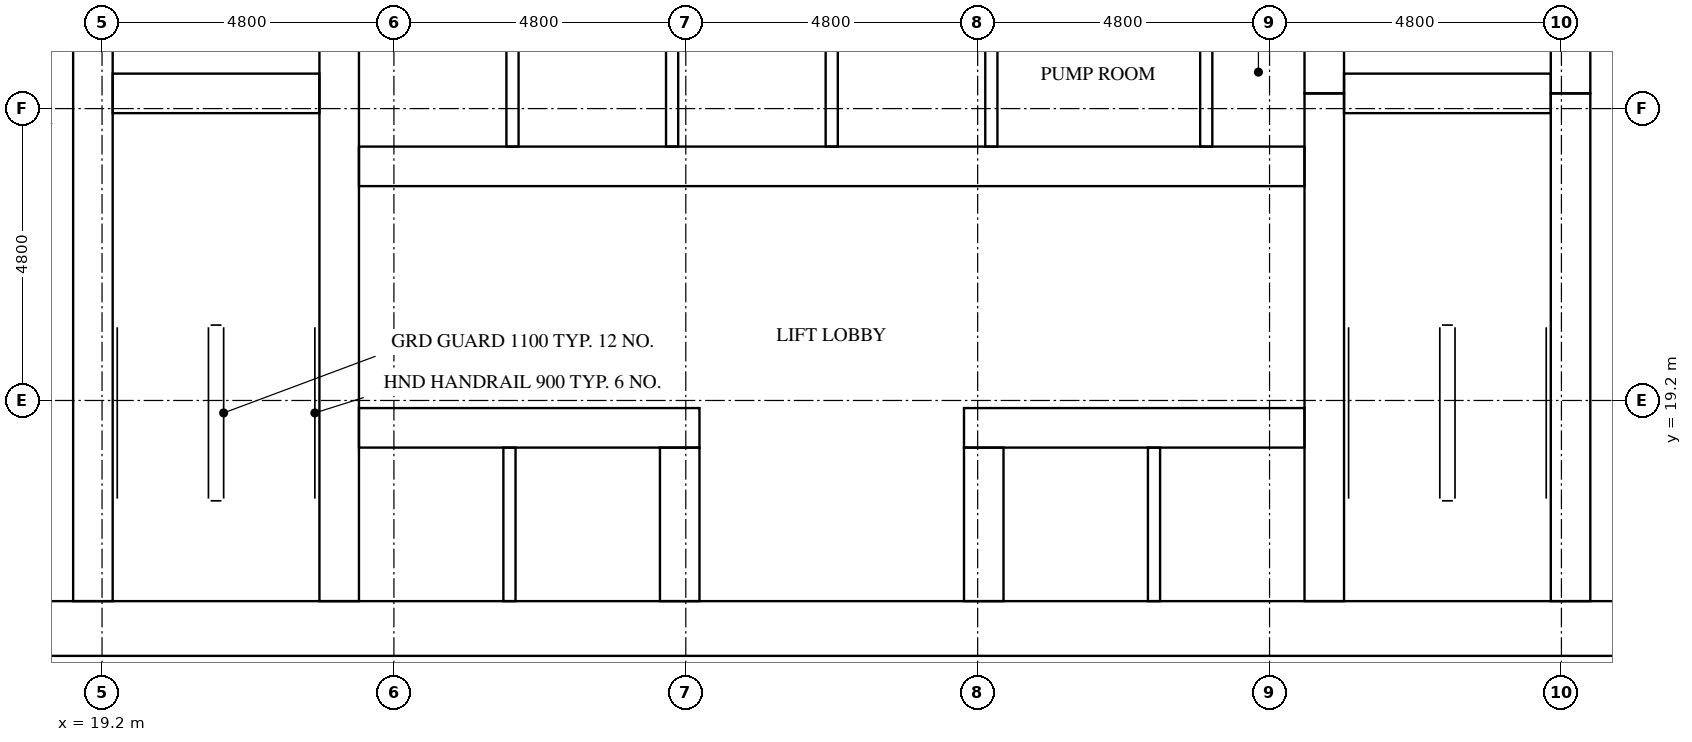
"""IFC4 building model, lengths in metres.
Left out: names, types, materials, properties, quantities, classifications, styles, units other than length and angle.
Written with IfcOpenShell. Run it as: python <this file> out.ifc"""

import sys

from ifc_helpers import new_model, si_unit, direction, frame, frame_2d, origin, place, context, subcontext, project, spatial, rectangle, extrude, element, fill, save


model = new_model("IFC4")
c1 = context("Model", 3, precision=1e-05, world=origin(), true_north=direction((0.0, 1.0)))
c2 = subcontext(c1, "Body", "Model", "MODEL_VIEW")
j1 = project(units=[si_unit("LENGTHUNIT", "METRE"), si_unit("PLANEANGLEUNIT", "RADIAN")], contexts=[c1])
p1 = place(None, origin())
s1 = spatial("IfcSite", under=j1, at=p1, CompositionType="ELEMENT")
p2 = place(p1, origin())
s2 = spatial("IfcBuilding", under=s1, at=p2, CompositionType="ELEMENT")
p3 = place(p2, frame((0.0, 0.0, 80.3)))
s3 = spatial("IfcBuildingStorey", under=s2, at=p3, CompositionType="ELEMENT", Elevation=80.3)
p4 = place(p3, frame((15.0, 15.45, 0.0), z_axis=(0.0, 0.0, 1.0), x_axis=(1.0, 0.0, 0.0)))
e1 = element("IfcWall", 1, at=p4, inside=s3, PredefinedType="SHEAR", context=c2, shape_type="SweptSolid", body=[
    extrude(rectangle(XDim=32.4, YDim=0.9, at=frame_2d((16.2, 0.0))), origin(), (0.0, 0.0, 1.0), 3.1),
])
p5 = place(p4, frame((15.3, 0.0, 0.0)))
e2 = element("IfcOpeningElement", 2, at=p5, cuts=e1, PredefinedType="OPENING", context=c2, shape_type="SweptSolid", body=[
    extrude(rectangle(XDim=1.8, YDim=2.1, at=frame_2d((0.9, 1.05))), frame((0.0, 0.46, 0.0), z_axis=(0.0, -1.0, 0.0), x_axis=(1.0, 0.0, 0.0)), (0.0, 0.0, 1.0), 0.92),
])
p6 = place(p3, frame((19.05, 15.9, 0.0), z_axis=(0.0, 0.0, 1.0), x_axis=(0.0, 1.0, 0.0)))
e3 = element("IfcWall", 3, at=p6, inside=s3, PredefinedType="SHEAR", context=c2, shape_type="SweptSolid", body=[
    extrude(rectangle(XDim=15.025, YDim=0.65, at=frame_2d((7.513, 0.0))), origin(), (0.0, 0.0, 1.0), 3.1),
])
p7 = place(p6, frame((9.55, 0.0, 0.0)))
e4 = element("IfcOpeningElement", 4, at=p7, cuts=e3, PredefinedType="OPENING", context=c2, shape_type="SweptSolid", body=[
    extrude(rectangle(XDim=1.1, YDim=2.1, at=frame_2d((0.55, 1.05))), frame((0.0, 0.335, 0.0), z_axis=(0.0, -1.0, 0.0), x_axis=(1.0, 0.0, 0.0)), (0.0, 0.0, 1.0), 0.67),
])
p8 = place(p6, frame((13.05, 0.0, 0.0)))
e5 = element("IfcOpeningElement", 5, at=p8, cuts=e3, PredefinedType="OPENING", context=c2, shape_type="SweptSolid", body=[
    extrude(rectangle(XDim=1.1, YDim=2.1, at=frame_2d((0.55, 1.05))), frame((0.0, 0.335, 0.0), z_axis=(0.0, -1.0, 0.0), x_axis=(1.0, 0.0, 0.0)), (0.0, 0.0, 1.0), 0.67),
])
p9 = place(p6, frame((0.3, 0.0, 0.0)))
e6 = element("IfcOpeningElement", 6, at=p9, cuts=e3, PredefinedType="OPENING", context=c2, shape_type="SweptSolid", body=[
    extrude(rectangle(XDim=1.2, YDim=2.1, at=frame_2d((0.6, 1.05))), frame((0.0, 0.335, 0.0), z_axis=(0.0, -1.0, 0.0), x_axis=(1.0, 0.0, 0.0)), (0.0, 0.0, 1.0), 0.67),
])
p10 = place(p3, frame((23.1, 15.9, 0.0), z_axis=(0.0, 0.0, 1.0), x_axis=(0.0, 1.0, 0.0)))
e7 = element("IfcWall", 7, at=p10, inside=s3, PredefinedType="SHEAR", context=c2, shape_type="SweptSolid", body=[
    extrude(rectangle(XDim=21.0, YDim=0.65, at=frame_2d((10.5, 0.0))), origin(), (0.0, 0.0, 1.0), 3.1),
])
p11 = place(p3, frame((39.3, 15.9, 0.0), z_axis=(0.0, 0.0, 1.0), x_axis=(0.0, 1.0, 0.0)))
e8 = element("IfcWall", 8, at=p11, inside=s3, PredefinedType="SHEAR", context=c2, shape_type="SweptSolid", body=[
    extrude(rectangle(XDim=8.35, YDim=0.65, at=frame_2d((4.175, 0.0))), origin(), (0.0, 0.0, 1.0), 3.1),
])
p12 = place(p3, frame((39.3, 24.25, 0.0), z_axis=(0.0, 0.0, 1.0), x_axis=(0.0, 1.0, 0.0)))
e9 = element("IfcWall", 9, at=p12, inside=s3, PredefinedType="SHEAR", context=c2, shape_type="SweptSolid", body=[
    extrude(rectangle(XDim=3.5, YDim=0.65, at=frame_2d((1.75, 0.0))), origin(), (0.0, 0.0, 1.0), 3.1),
])
p13 = place(p3, frame((43.35, 15.9, 0.0), z_axis=(0.0, 0.0, 1.0), x_axis=(0.0, 1.0, 0.0)))
e10 = element("IfcWall", 10, at=p13, inside=s3, PredefinedType="SHEAR", context=c2, shape_type="SweptSolid", body=[
    extrude(rectangle(XDim=8.35, YDim=0.65, at=frame_2d((4.175, 0.0))), origin(), (0.0, 0.0, 1.0), 3.1),
])
p14 = place(p13, frame((0.3, 0.0, 0.0)))
e11 = element("IfcOpeningElement", 11, at=p14, cuts=e10, PredefinedType="OPENING", context=c2, shape_type="SweptSolid", body=[
    extrude(rectangle(XDim=1.2, YDim=2.1, at=frame_2d((0.6, 1.05))), frame((0.0, 0.335, 0.0), z_axis=(0.0, -1.0, 0.0), x_axis=(1.0, 0.0, 0.0)), (0.0, 0.0, 1.0), 0.67),
])
p15 = place(p3, frame((43.35, 24.25, 0.0), z_axis=(0.0, 0.0, 1.0), x_axis=(0.0, 1.0, 0.0)))
e12 = element("IfcWall", 12, at=p15, inside=s3, PredefinedType="SHEAR", context=c2, shape_type="SweptSolid", body=[
    extrude(rectangle(XDim=3.5, YDim=0.65, at=frame_2d((1.75, 0.0))), origin(), (0.0, 0.0, 1.0), 3.1),
])
p16 = place(p15, frame((1.2, 0.0, 0.0)))
e13 = element("IfcOpeningElement", 13, at=p16, cuts=e12, PredefinedType="OPENING", context=c2, shape_type="SweptSolid", body=[
    extrude(rectangle(XDim=1.1, YDim=2.1, at=frame_2d((0.55, 1.05))), frame((0.0, 0.335, 0.0), z_axis=(0.0, -1.0, 0.0), x_axis=(1.0, 0.0, 0.0)), (0.0, 0.0, 1.0), 0.67),
])
for number, where, z_axis, x_axis in (
    (14, (19.375, 24.25, 0.0), (0.0, 0.0, 1.0), (1.0, 0.0, 0.0)),
    (15, (39.625, 24.25, 0.0), (0.0, 0.0, 1.0), (1.0, 0.0, 0.0)),
):
    element("IfcWall", number, at=place(p3, frame(where, z_axis=z_axis, x_axis=x_axis)), inside=s3, PredefinedType="SHEAR", context=c2, shape_type="SweptSolid", body=[
        extrude(rectangle(XDim=3.4, YDim=0.65, at=frame_2d((1.7, 0.0))), origin(), (0.0, 0.0, 1.0), 3.1),
    ])
p17 = place(p3, frame((23.425, 18.75, 0.0), z_axis=(0.0, 0.0, 1.0), x_axis=(1.0, 0.0, 0.0)))
e16 = element("IfcWall", 16, at=p17, inside=s3, PredefinedType="SHEAR", context=c2, shape_type="SweptSolid", body=[
    extrude(rectangle(XDim=5.6, YDim=0.65, at=frame_2d((2.8, 0.0))), origin(), (0.0, 0.0, 1.0), 3.1),
])
p18 = place(p17, frame((0.637, 0.0, 0.0)))
e17 = element("IfcOpeningElement", 17, at=p18, cuts=e16, PredefinedType="OPENING", context=c2, shape_type="SweptSolid", body=[
    extrude(rectangle(XDim=1.1, YDim=2.1, at=frame_2d((0.55, 1.05))), frame((0.0, 0.335, 0.0), z_axis=(0.0, -1.0, 0.0), x_axis=(1.0, 0.0, 0.0)), (0.0, 0.0, 1.0), 0.67),
])
p19 = place(p17, frame((3.212, 0.0, 0.0)))
e18 = element("IfcOpeningElement", 18, at=p19, cuts=e16, PredefinedType="OPENING", context=c2, shape_type="SweptSolid", body=[
    extrude(rectangle(XDim=1.1, YDim=2.1, at=frame_2d((0.55, 1.05))), frame((0.0, 0.335, 0.0), z_axis=(0.0, -1.0, 0.0), x_axis=(1.0, 0.0, 0.0)), (0.0, 0.0, 1.0), 0.67),
])
p20 = place(p3, frame((33.375, 18.75, 0.0), z_axis=(0.0, 0.0, 1.0), x_axis=(1.0, 0.0, 0.0)))
e19 = element("IfcWall", 19, at=p20, inside=s3, PredefinedType="SHEAR", context=c2, shape_type="SweptSolid", body=[
    extrude(rectangle(XDim=5.6, YDim=0.65, at=frame_2d((2.8, 0.0))), origin(), (0.0, 0.0, 1.0), 3.1),
])
p21 = place(p20, frame((1.288, 0.0, 0.0)))
e20 = element("IfcOpeningElement", 20, at=p21, cuts=e19, PredefinedType="OPENING", context=c2, shape_type="SweptSolid", body=[
    extrude(rectangle(XDim=1.1, YDim=2.1, at=frame_2d((0.55, 1.05))), frame((0.0, 0.335, 0.0), z_axis=(0.0, -1.0, 0.0), x_axis=(1.0, 0.0, 0.0)), (0.0, 0.0, 1.0), 0.67),
])
p22 = place(p20, frame((3.863, 0.0, 0.0)))
e21 = element("IfcOpeningElement", 21, at=p22, cuts=e19, PredefinedType="OPENING", context=c2, shape_type="SweptSolid", body=[
    extrude(rectangle(XDim=1.1, YDim=2.1, at=frame_2d((0.55, 1.05))), frame((0.0, 0.335, 0.0), z_axis=(0.0, -1.0, 0.0), x_axis=(1.0, 0.0, 0.0)), (0.0, 0.0, 1.0), 0.67),
])
p23 = place(p3, frame((23.425, 23.05, 0.0), z_axis=(0.0, 0.0, 1.0), x_axis=(1.0, 0.0, 0.0)))
e22 = element("IfcWall", 22, at=p23, inside=s3, PredefinedType="SHEAR", context=c2, shape_type="SweptSolid", body=[
    extrude(rectangle(XDim=15.55, YDim=0.65, at=frame_2d((7.775, 0.0))), origin(), (0.0, 0.0, 1.0), 3.1),
])
p24 = place(p23, frame((0.663, 0.0, 0.0)))
e23 = element("IfcOpeningElement", 23, at=p24, cuts=e22, PredefinedType="OPENING", context=c2, shape_type="SweptSolid", body=[
    extrude(rectangle(XDim=1.1, YDim=2.1, at=frame_2d((0.55, 1.05))), frame((0.0, 0.335, 0.0), z_axis=(0.0, -1.0, 0.0), x_axis=(1.0, 0.0, 0.0)), (0.0, 0.0, 1.0), 0.67),
])
p25 = place(p23, frame((3.288, 0.0, 0.0)))
e24 = element("IfcOpeningElement", 24, at=p25, cuts=e22, PredefinedType="OPENING", context=c2, shape_type="SweptSolid", body=[
    extrude(rectangle(XDim=1.1, YDim=2.1, at=frame_2d((0.55, 1.05))), frame((0.0, 0.335, 0.0), z_axis=(0.0, -1.0, 0.0), x_axis=(1.0, 0.0, 0.0)), (0.0, 0.0, 1.0), 0.67),
])
p26 = place(p23, frame((11.667, 0.0, 0.0)))
e25 = element("IfcOpeningElement", 25, at=p26, cuts=e22, PredefinedType="OPENING", context=c2, shape_type="SweptSolid", body=[
    extrude(rectangle(XDim=1.0, YDim=2.1, at=frame_2d((0.5, 1.05))), frame((0.0, 0.335, 0.0), z_axis=(0.0, -1.0, 0.0), x_axis=(1.0, 0.0, 0.0)), (0.0, 0.0, 1.0), 0.67),
])
p27 = place(p23, frame((14.292, 0.0, 0.0)))
e26 = element("IfcOpeningElement", 26, at=p27, cuts=e22, PredefinedType="OPENING", context=c2, shape_type="SweptSolid", body=[
    extrude(rectangle(XDim=1.0, YDim=2.1, at=frame_2d((0.5, 1.05))), frame((0.0, 0.335, 0.0), z_axis=(0.0, -1.0, 0.0), x_axis=(1.0, 0.0, 0.0)), (0.0, 0.0, 1.0), 0.67),
])
for number, where, z_axis, x_axis in (
    (27, (28.7, 15.9, 0.0), (0.0, 0.0, 1.0), (0.0, 1.0, 0.0)),
    (28, (33.7, 15.9, 0.0), (0.0, 0.0, 1.0), (0.0, 1.0, 0.0)),
):
    element("IfcWall", number, at=place(p3, frame(where, z_axis=z_axis, x_axis=x_axis)), inside=s3, PredefinedType="SHEAR", context=c2, shape_type="SweptSolid", body=[
        extrude(rectangle(XDim=2.525, YDim=0.65, at=frame_2d((1.263, 0.0))), origin(), (0.0, 0.0, 1.0), 3.1),
    ])
for number, where, z_axis, x_axis in (
    (29, (25.95, 23.375, 0.0), (0.0, 0.0, 1.0), (0.0, 1.0, 0.0)),
    (30, (28.575, 23.375, 0.0), (0.0, 0.0, 1.0), (0.0, 1.0, 0.0)),
    (31, (31.2, 23.375, 0.0), (0.0, 0.0, 1.0), (0.0, 1.0, 0.0)),
    (32, (33.825, 23.375, 0.0), (0.0, 0.0, 1.0), (0.0, 1.0, 0.0)),
):
    element("IfcWall", number, at=place(p3, frame(where, z_axis=z_axis, x_axis=x_axis)), inside=s3, PredefinedType="SOLIDWALL", context=c2, shape_type="SweptSolid", body=[
        extrude(rectangle(XDim=2.45, YDim=0.2, at=frame_2d((1.225, 0.0))), origin(), (0.0, 0.0, 1.0), 3.1),
    ])
for number, where, z_axis, x_axis in (
    (33, (25.9, 15.9, 0.0), (0.0, 0.0, 1.0), (0.0, 1.0, 0.0)),
    (34, (36.5, 15.9, 0.0), (0.0, 0.0, 1.0), (0.0, 1.0, 0.0)),
):
    element("IfcWall", number, at=place(p3, frame(where, z_axis=z_axis, x_axis=x_axis)), inside=s3, PredefinedType="SOLIDWALL", context=c2, shape_type="SweptSolid", body=[
        extrude(rectangle(XDim=2.525, YDim=0.2, at=frame_2d((1.263, 0.0))), origin(), (0.0, 0.0, 1.0), 3.1),
    ])
p28 = place(p3, frame((37.359, 23.375, 0.0), z_axis=(0.0, 0.0, 1.0), x_axis=(0.0, 1.0, 0.0)))
e35 = element("IfcWall", 35, at=p28, inside=s3, PredefinedType="PARTITIONING", context=c2, shape_type="SweptSolid", body=[
    extrude(rectangle(XDim=2.45, YDim=0.2, at=frame_2d((1.225, 0.0))), origin(), (0.0, 0.0, 1.0), 3.1),
])
p29 = place(p18, origin())
e36 = element("IfcDoor", 36, at=p29, inside=s3, OperationType="DOUBLE_DOOR_SLIDING", PredefinedType="DOOR", context=c2, shape_type="SweptSolid", body=[
    extrude(rectangle(XDim=1.1, YDim=2.1, at=frame_2d((0.55, 1.05))), frame((0.0, 0.025, 0.0), z_axis=(0.0, -1.0, 0.0), x_axis=(1.0, 0.0, 0.0)), (0.0, 0.0, 1.0), 0.05),
])
fill(e17, e36)
p30 = place(p19, origin())
e37 = element("IfcDoor", 37, at=p30, inside=s3, OperationType="DOUBLE_DOOR_SLIDING", PredefinedType="DOOR", context=c2, shape_type="SweptSolid", body=[
    extrude(rectangle(XDim=1.1, YDim=2.1, at=frame_2d((0.55, 1.05))), frame((0.0, 0.025, 0.0), z_axis=(0.0, -1.0, 0.0), x_axis=(1.0, 0.0, 0.0)), (0.0, 0.0, 1.0), 0.05),
])
fill(e18, e37)
p31 = place(p21, origin())
e38 = element("IfcDoor", 38, at=p31, inside=s3, OperationType="DOUBLE_DOOR_SLIDING", PredefinedType="DOOR", context=c2, shape_type="SweptSolid", body=[
    extrude(rectangle(XDim=1.1, YDim=2.1, at=frame_2d((0.55, 1.05))), frame((0.0, 0.025, 0.0), z_axis=(0.0, -1.0, 0.0), x_axis=(1.0, 0.0, 0.0)), (0.0, 0.0, 1.0), 0.05),
])
fill(e20, e38)
p32 = place(p22, origin())
e39 = element("IfcDoor", 39, at=p32, inside=s3, OperationType="DOUBLE_DOOR_SLIDING", PredefinedType="DOOR", context=c2, shape_type="SweptSolid", body=[
    extrude(rectangle(XDim=1.1, YDim=2.1, at=frame_2d((0.55, 1.05))), frame((0.0, 0.025, 0.0), z_axis=(0.0, -1.0, 0.0), x_axis=(1.0, 0.0, 0.0)), (0.0, 0.0, 1.0), 0.05),
])
fill(e21, e39)
p33 = place(p24, origin())
e40 = element("IfcDoor", 40, at=p33, inside=s3, OperationType="DOUBLE_DOOR_SLIDING", PredefinedType="DOOR", context=c2, shape_type="SweptSolid", body=[
    extrude(rectangle(XDim=1.1, YDim=2.1, at=frame_2d((0.55, 1.05))), frame((0.0, 0.025, 0.0), z_axis=(0.0, -1.0, 0.0), x_axis=(1.0, 0.0, 0.0)), (0.0, 0.0, 1.0), 0.05),
])
fill(e23, e40)
p34 = place(p25, origin())
e41 = element("IfcDoor", 41, at=p34, inside=s3, OperationType="DOUBLE_DOOR_SLIDING", PredefinedType="DOOR", context=c2, shape_type="SweptSolid", body=[
    extrude(rectangle(XDim=1.1, YDim=2.1, at=frame_2d((0.55, 1.05))), frame((0.0, 0.025, 0.0), z_axis=(0.0, -1.0, 0.0), x_axis=(1.0, 0.0, 0.0)), (0.0, 0.0, 1.0), 0.05),
])
fill(e24, e41)
p35 = place(p9, frame((1.2, 0.0, 0.0), z_axis=(0.0, 0.0, 1.0), x_axis=(-1.0, 0.0, 0.0)))
e42 = element("IfcDoor", 42, at=p35, inside=s3, OperationType="SINGLE_SWING_RIGHT", PredefinedType="DOOR", context=c2, shape_type="SweptSolid", body=[
    extrude(rectangle(XDim=1.2, YDim=2.1, at=frame_2d((0.6, 1.05))), frame((0.0, 0.025, 0.0), z_axis=(0.0, -1.0, 0.0), x_axis=(1.0, 0.0, 0.0)), (0.0, 0.0, 1.0), 0.05),
])
fill(e6, e42)
p36 = place(p14, origin())
e43 = element("IfcDoor", 43, at=p36, inside=s3, OperationType="SINGLE_SWING_LEFT", PredefinedType="DOOR", context=c2, shape_type="SweptSolid", body=[
    extrude(rectangle(XDim=1.2, YDim=2.1, at=frame_2d((0.6, 1.05))), frame((0.0, 0.025, 0.0), z_axis=(0.0, -1.0, 0.0), x_axis=(1.0, 0.0, 0.0)), (0.0, 0.0, 1.0), 0.05),
])
fill(e11, e43)
p37 = place(p5, frame((1.8, 0.0, 0.0), z_axis=(0.0, 0.0, 1.0), x_axis=(-1.0, 0.0, 0.0)))
e44 = element("IfcDoor", 44, at=p37, inside=s3, OperationType="DOUBLE_DOOR_SINGLE_SWING", PredefinedType="DOOR", context=c2, shape_type="SweptSolid", body=[
    extrude(rectangle(XDim=1.8, YDim=2.1, at=frame_2d((0.9, 1.05))), frame((0.0, 0.025, 0.0), z_axis=(0.0, -1.0, 0.0), x_axis=(1.0, 0.0, 0.0)), (0.0, 0.0, 1.0), 0.05),
])
fill(e2, e44)
p38 = place(p26, frame((1.0, 0.0, 0.0), z_axis=(0.0, 0.0, 1.0), x_axis=(-1.0, 0.0, 0.0)))
e45 = element("IfcDoor", 45, at=p38, inside=s3, OperationType="SINGLE_SWING_LEFT", PredefinedType="DOOR", context=c2, shape_type="SweptSolid", body=[
    extrude(rectangle(XDim=1.0, YDim=2.1, at=frame_2d((0.5, 1.05))), frame((0.0, 0.025, 0.0), z_axis=(0.0, -1.0, 0.0), x_axis=(1.0, 0.0, 0.0)), (0.0, 0.0, 1.0), 0.05),
])
fill(e25, e45)
p39 = place(p27, frame((1.0, 0.0, 0.0), z_axis=(0.0, 0.0, 1.0), x_axis=(-1.0, 0.0, 0.0)))
e46 = element("IfcDoor", 46, at=p39, inside=s3, OperationType="SINGLE_SWING_RIGHT", PredefinedType="DOOR", context=c2, shape_type="SweptSolid", body=[
    extrude(rectangle(XDim=1.0, YDim=2.1, at=frame_2d((0.5, 1.05))), frame((0.0, 0.025, 0.0), z_axis=(0.0, -1.0, 0.0), x_axis=(1.0, 0.0, 0.0)), (0.0, 0.0, 1.0), 0.05),
])
fill(e26, e46)
save(model, sys.argv[1])
